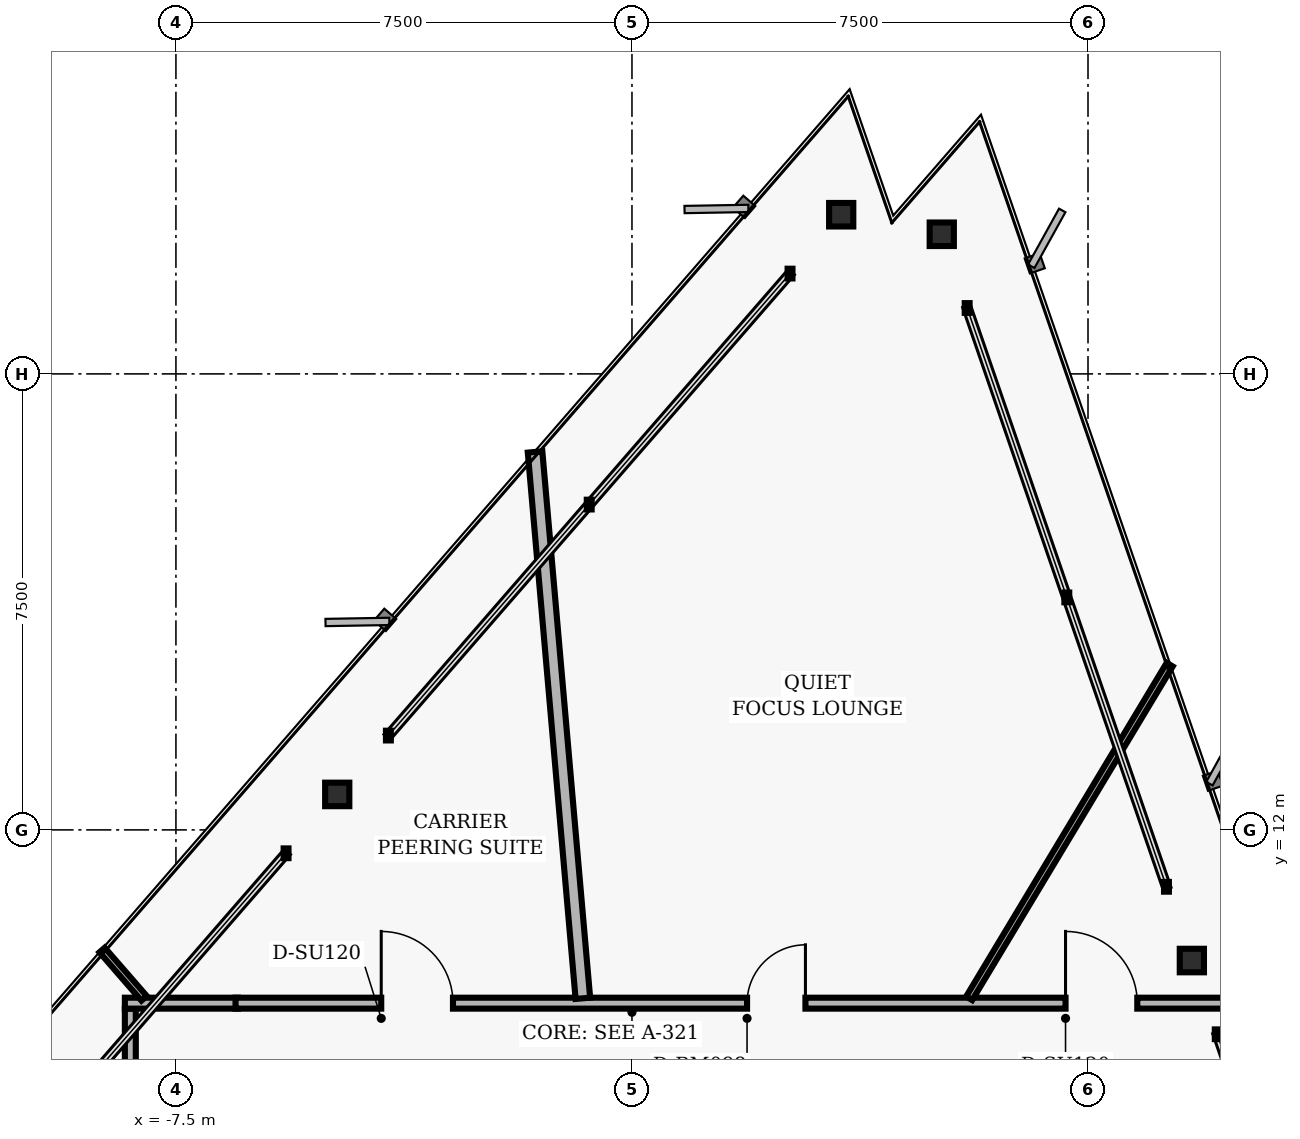
"""IFC4 building model, lengths in metres.
Left out: names, types, materials, properties, quantities, classifications, styles, units other than length and angle.
Written with IfcOpenShell. Run it as: python <this file> out.ifc"""

import sys

from ifc_helpers import new_model, si_unit, direction, frame, frame_2d, origin, origin_2d, place, context, subcontext, project, spatial, rectangle, i_section, extrude, element, fill, save


model = new_model("IFC4")
c1 = context("Model", 3, precision=1e-05, world=origin(), true_north=direction((0.0, 1.0)))
c2 = subcontext(c1, "Body", "Model", "MODEL_VIEW")
j1 = project(units=[si_unit("LENGTHUNIT", "METRE"), si_unit("PLANEANGLEUNIT", "RADIAN")], contexts=[c1])
p1 = place(None, origin())
s1 = spatial("IfcSite", under=j1, at=p1, CompositionType="ELEMENT")
p2 = place(p1, origin())
s2 = spatial("IfcBuilding", under=s1, at=p2, CompositionType="ELEMENT")
p3 = place(p2, frame((0.0, 0.0, 168.48)))
s3 = spatial("IfcBuildingStorey", under=s2, at=p3, CompositionType="ELEMENT", Elevation=168.48)
for number, where, z_axis, x_axis in (
    (1, (9.208, 9.851, 0.0), (0.0, 0.0, 1.0), (1.0, 0.0, 0.0)),
    (2, (5.095, 21.796, 0.0), (0.0, 0.0, 1.0), (1.0, 0.0, 0.0)),
    (3, (3.441, 22.118, 0.0), (0.0, 0.0, 1.0), (1.0, 0.0, 0.0)),
    (4, (-4.847, 12.583, 0.0), (0.0, 0.0, 1.0), (1.0, 0.0, 0.0)),
):
    element("IfcColumn", number, at=place(p3, frame(where, z_axis=z_axis, x_axis=x_axis)), inside=s3, PredefinedType="COLUMN", context=c2, shape_type="SweptSolid", body=[
        extrude(i_section(OverallWidth=0.398, OverallDepth=0.387, WebThickness=0.021, FlangeThickness=0.033, FilletRadius=0.018, at=origin_2d()), origin(), (0.0, 0.0, 1.0), 3.04),
    ])
p4 = place(p3, frame((-8.25, 7.18, 0.0), z_axis=(0.0, 0.0, 1.0), x_axis=(0.0, 1.0, 0.0)))
e5 = element("IfcWall", 5, at=p4, inside=s3, PredefinedType="PARTITIONING", context=c2, shape_type="SweptSolid", body=[
    extrude(rectangle(XDim=1.88, YDim=0.18, at=frame_2d((0.94, 0.0))), origin(), (0.0, 0.0, 1.0), 2.693),
])
p5 = place(p3, frame((-8.34, 9.15, 0.0), z_axis=(0.0, 0.0, 1.0), x_axis=(1.0, 0.0, 0.0)))
e6 = element("IfcWall", 6, at=p5, inside=s3, PredefinedType="PARTITIONING", context=c2, shape_type="SweptSolid", body=[
    extrude(rectangle(XDim=1.86, YDim=0.18, at=frame_2d((0.93, 0.0))), origin(), (0.0, 0.0, 1.0), 2.693),
])
p6 = place(p3, frame((-6.52, 9.15, 0.0), z_axis=(0.0, 0.0, 1.0), x_axis=(1.0, 0.0, 0.0)))
e7 = element("IfcWall", 7, at=p6, inside=s3, PredefinedType="PARTITIONING", context=c2, shape_type="SweptSolid", body=[
    extrude(rectangle(XDim=16.662, YDim=0.18, at=frame_2d((8.331, 0.0))), origin(), (0.0, 0.0, 1.0), 2.693),
])
p7 = place(p6, frame((13.65, 0.0, 0.0)))
e8 = element("IfcOpeningElement", 8, at=p7, cuts=e7, PredefinedType="OPENING", context=c2, shape_type="SweptSolid", body=[
    extrude(rectangle(XDim=1.18, YDim=2.02, at=frame_2d((0.59, 1.01))), frame((0.0, 0.1, 0.0), z_axis=(0.0, -1.0, 0.0), x_axis=(1.0, 0.0, 0.0)), (0.0, 0.0, 1.0), 0.2),
])
p8 = place(p6, frame((8.413, 0.0, 0.0)))
e9 = element("IfcOpeningElement", 9, at=p8, cuts=e7, PredefinedType="OPENING", context=c2, shape_type="SweptSolid", body=[
    extrude(rectangle(XDim=0.96, YDim=2.02, at=frame_2d((0.48, 1.01))), frame((0.0, 0.1, 0.0), z_axis=(0.0, -1.0, 0.0), x_axis=(1.0, 0.0, 0.0)), (0.0, 0.0, 1.0), 0.2),
])
p9 = place(p6, frame((2.396, 0.0, 0.0)))
e10 = element("IfcOpeningElement", 10, at=p9, cuts=e7, PredefinedType="OPENING", context=c2, shape_type="SweptSolid", body=[
    extrude(rectangle(XDim=1.18, YDim=2.02, at=frame_2d((0.59, 1.01))), frame((0.0, 0.1, 0.0), z_axis=(0.0, -1.0, 0.0), x_axis=(1.0, 0.0, 0.0)), (0.0, 0.0, 1.0), 0.2),
])
p10 = place(p3, frame((5.546, 9.23, 0.0), z_axis=(0.0, 0.0, 1.0), x_axis=(0.515028361349, 0.857173137123, 0.0)))
e11 = element("IfcWall", 11, at=p10, inside=s3, PredefinedType="MOVABLE", context=c2, shape_type="SweptSolid", body=[
    extrude(rectangle(XDim=6.403, YDim=0.115, at=frame_2d((3.201, 0.0))), origin(), (0.0, 0.0, 1.0), 2.693),
])
p11 = place(p3, frame((-0.808, 9.23, 0.0), z_axis=(0.0, 0.0, 1.0), x_axis=(-0.087150498686, 0.996195156874, 0.0)))
e12 = element("IfcWall", 12, at=p11, inside=s3, PredefinedType="PARTITIONING", context=c2, shape_type="SweptSolid", body=[
    extrude(rectangle(XDim=9.021, YDim=0.24, at=frame_2d((4.51, 0.0))), origin(), (0.0, 0.0, 1.0), 2.693),
])
p12 = place(p3, frame((-8.023, 9.23, 0.0), z_axis=(0.0, 0.0, 1.0), x_axis=(-0.656121313299, 0.754655432787, 0.0)))
e13 = element("IfcWall", 13, at=p12, inside=s3, PredefinedType="MOVABLE", context=c2, shape_type="SweptSolid", body=[
    extrude(rectangle(XDim=1.053, YDim=0.115, at=frame_2d((0.526, 0.0))), origin(), (0.0, 0.0, 1.0), 2.693),
])
p13 = place(p7, origin())
e14 = element("IfcDoor", 14, at=p13, inside=s3, OperationType="SINGLE_SWING_LEFT", PredefinedType="DOOR", context=c2, shape_type="SweptSolid", body=[
    extrude(rectangle(XDim=1.18, YDim=2.02, at=frame_2d((0.59, 1.01))), frame((0.0, 0.025, 0.0), z_axis=(0.0, -1.0, 0.0), x_axis=(1.0, 0.0, 0.0)), (0.0, 0.0, 1.0), 0.05),
])
fill(e8, e14)
p14 = place(p8, origin())
e15 = element("IfcDoor", 15, at=p14, inside=s3, OperationType="SINGLE_SWING_RIGHT", PredefinedType="DOOR", context=c2, shape_type="SweptSolid", body=[
    extrude(rectangle(XDim=0.96, YDim=2.02, at=frame_2d((0.48, 1.01))), frame((0.0, 0.025, 0.0), z_axis=(0.0, -1.0, 0.0), x_axis=(1.0, 0.0, 0.0)), (0.0, 0.0, 1.0), 0.05),
])
fill(e9, e15)
p15 = place(p9, origin())
e16 = element("IfcDoor", 16, at=p15, inside=s3, OperationType="SINGLE_SWING_LEFT", PredefinedType="DOOR", context=c2, shape_type="SweptSolid", body=[
    extrude(rectangle(XDim=1.18, YDim=2.02, at=frame_2d((0.59, 1.01))), frame((0.0, 0.025, 0.0), z_axis=(0.0, -1.0, 0.0), x_axis=(1.0, 0.0, 0.0)), (0.0, 0.0, 1.0), 0.05),
])
fill(e10, e16)
save(model, sys.argv[1])
